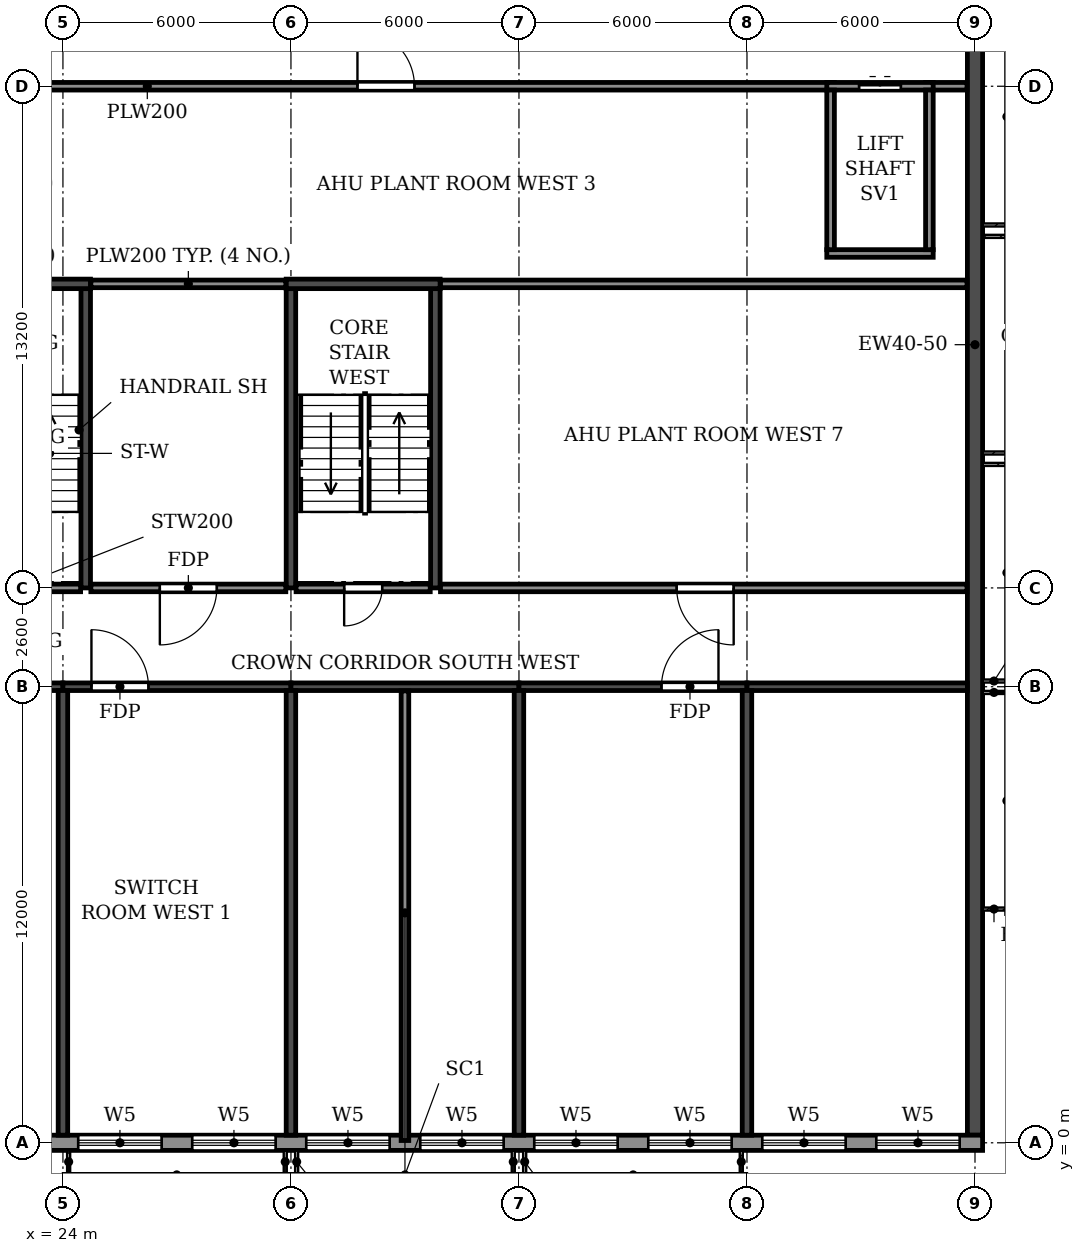
"""IFC4 building model, lengths in metres.
Left out: names, types, materials, properties, quantities, classifications, styles, units other than length and angle.
Written with IfcOpenShell. Run it as: python <this file> out.ifc"""

import sys

from ifc_helpers import new_model, si_unit, direction, frame, frame_2d, origin, place, context, subcontext, project, spatial, rectangle, extrude, element, fill, save


model = new_model("IFC4")
c1 = context("Model", 3, precision=1e-05, world=origin(), true_north=direction((0.0, 1.0)))
c2 = subcontext(c1, "Body", "Model", "MODEL_VIEW")
j1 = project(units=[si_unit("LENGTHUNIT", "METRE"), si_unit("PLANEANGLEUNIT", "RADIAN")], contexts=[c1])
p1 = place(None, origin())
s1 = spatial("IfcSite", under=j1, at=p1, CompositionType="ELEMENT")
p2 = place(p1, origin())
s2 = spatial("IfcBuilding", under=s1, at=p2, CompositionType="ELEMENT")
p3 = place(p2, frame((0.0, 0.0, 282.3)))
s3 = spatial("IfcBuildingStorey", under=s2, at=p3, CompositionType="ELEMENT", Elevation=282.3)
for number, where, z_axis, x_axis in (
    (1, (24.0, 0.2, 0.0), (0.0, 0.0, 1.0), (0.0, 1.0, 0.0)),
    (2, (30.0, 0.2, 0.0), (0.0, 0.0, 1.0), (0.0, 1.0, 0.0)),
    (3, (36.0, 0.2, 0.0), (0.0, 0.0, 1.0), (0.0, 1.0, 0.0)),
    (4, (42.0, 0.2, 0.0), (0.0, 0.0, 1.0), (0.0, 1.0, 0.0)),
):
    element("IfcWall", number, at=place(p3, frame(where, z_axis=z_axis, x_axis=x_axis)), inside=s3, PredefinedType="SHEAR", context=c2, shape_type="SweptSolid", body=[
        extrude(rectangle(XDim=11.7, YDim=0.25, at=frame_2d((5.85, 0.0))), origin(), (0.0, 0.0, 1.0), 3.05),
    ])
p4 = place(p3, frame((48.0, 0.2, 0.0), z_axis=(0.0, 0.0, 1.0), x_axis=(0.0, 1.0, 0.0)))
e5 = element("IfcWall", 5, at=p4, inside=s3, PredefinedType="SHEAR", context=c2, shape_type="SweptSolid", body=[
    extrude(rectangle(XDim=40.8, YDim=0.4, at=frame_2d((20.4, 0.0))), origin(), (0.0, 0.0, 1.0), 3.05),
])
p5 = place(p3, frame((18.2, 12.0, 0.0), z_axis=(0.0, 0.0, 1.0), x_axis=(1.0, 0.0, 0.0)))
e6 = element("IfcWall", 6, at=p5, inside=s3, PredefinedType="SHEAR", context=c2, shape_type="SweptSolid", body=[
    extrude(rectangle(XDim=5.8, YDim=0.2, at=frame_2d((2.9, 0.0))), origin(), (0.0, 0.0, 1.0), 2.45),
])
p6 = place(p3, frame((24.0, 12.0, 0.0), z_axis=(0.0, 0.0, 1.0), x_axis=(1.0, 0.0, 0.0)))
e7 = element("IfcWall", 7, at=p6, inside=s3, PredefinedType="SHEAR", context=c2, shape_type="SweptSolid", body=[
    extrude(rectangle(XDim=6.0, YDim=0.2, at=frame_2d((3.0, 0.0))), origin(), (0.0, 0.0, 1.0), 2.45),
])
p7 = place(p6, frame((0.75, 0.0, 0.0)))
e8 = element("IfcOpeningElement", 8, at=p7, cuts=e7, PredefinedType="OPENING", context=c2, shape_type="SweptSolid", body=[
    extrude(rectangle(XDim=1.5, YDim=2.1, at=frame_2d((0.75, 1.05))), frame((0.0, 0.11, 0.0), z_axis=(0.0, -1.0, 0.0), x_axis=(1.0, 0.0, 0.0)), (0.0, 0.0, 1.0), 0.22),
])
p8 = place(p3, frame((30.0, 12.0, 0.0), z_axis=(0.0, 0.0, 1.0), x_axis=(1.0, 0.0, 0.0)))
e9 = element("IfcWall", 9, at=p8, inside=s3, PredefinedType="SHEAR", context=c2, shape_type="SweptSolid", body=[
    extrude(rectangle(XDim=6.0, YDim=0.2, at=frame_2d((3.0, 0.0))), origin(), (0.0, 0.0, 1.0), 2.45),
])
p9 = place(p3, frame((36.0, 12.0, 0.0), z_axis=(0.0, 0.0, 1.0), x_axis=(1.0, 0.0, 0.0)))
e10 = element("IfcWall", 10, at=p9, inside=s3, PredefinedType="SHEAR", context=c2, shape_type="SweptSolid", body=[
    extrude(rectangle(XDim=6.0, YDim=0.2, at=frame_2d((3.0, 0.0))), origin(), (0.0, 0.0, 1.0), 2.45),
])
p10 = place(p9, frame((3.75, 0.0, 0.0)))
e11 = element("IfcOpeningElement", 11, at=p10, cuts=e10, PredefinedType="OPENING", context=c2, shape_type="SweptSolid", body=[
    extrude(rectangle(XDim=1.5, YDim=2.1, at=frame_2d((0.75, 1.05))), frame((0.0, 0.11, 0.0), z_axis=(0.0, -1.0, 0.0), x_axis=(1.0, 0.0, 0.0)), (0.0, 0.0, 1.0), 0.22),
])
p11 = place(p3, frame((42.0, 12.0, 0.0), z_axis=(0.0, 0.0, 1.0), x_axis=(1.0, 0.0, 0.0)))
e12 = element("IfcWall", 12, at=p11, inside=s3, PredefinedType="SHEAR", context=c2, shape_type="SweptSolid", body=[
    extrude(rectangle(XDim=5.8, YDim=0.2, at=frame_2d((2.9, 0.0))), origin(), (0.0, 0.0, 1.0), 2.45),
])
p12 = place(p3, frame((24.6, 14.6, 0.0), z_axis=(0.0, 0.0, 1.0), x_axis=(0.0, 1.0, 0.0)))
e13 = element("IfcWall", 13, at=p12, inside=s3, PredefinedType="SOLIDWALL", context=c2, shape_type="SweptSolid", body=[
    extrude(rectangle(XDim=7.875, YDim=0.25, at=frame_2d((3.938, 0.0))), origin(), (0.0, 0.0, 1.0), 3.05),
])
p13 = place(p3, frame((20.675, 22.6, 0.0), z_axis=(0.0, 0.0, 1.0), x_axis=(1.0, 0.0, 0.0)))
e14 = element("IfcWall", 14, at=p13, inside=s3, PredefinedType="SOLIDWALL", context=c2, shape_type="SweptSolid", body=[
    extrude(rectangle(XDim=4.05, YDim=0.25, at=frame_2d((2.025, 0.0))), origin(), (0.0, 0.0, 1.0), 3.05),
])
for number, where, z_axis, x_axis in (
    (15, (30.0, 14.6, 0.0), (0.0, 0.0, 1.0), (0.0, 1.0, 0.0)),
    (16, (33.8, 14.6, 0.0), (0.0, 0.0, 1.0), (0.0, 1.0, 0.0)),
):
    element("IfcWall", number, at=place(p3, frame(where, z_axis=z_axis, x_axis=x_axis)), inside=s3, PredefinedType="SOLIDWALL", context=c2, shape_type="SweptSolid", body=[
        extrude(rectangle(XDim=7.875, YDim=0.25, at=frame_2d((3.938, 0.0))), origin(), (0.0, 0.0, 1.0), 3.05),
    ])
p14 = place(p3, frame((29.875, 22.6, 0.0), z_axis=(0.0, 0.0, 1.0), x_axis=(1.0, 0.0, 0.0)))
e17 = element("IfcWall", 17, at=p14, inside=s3, PredefinedType="SOLIDWALL", context=c2, shape_type="SweptSolid", body=[
    extrude(rectangle(XDim=4.05, YDim=0.25, at=frame_2d((2.025, 0.0))), origin(), (0.0, 0.0, 1.0), 3.05),
])
p15 = place(p3, frame((22.683, 0.0, 0.0), z_axis=(0.0, 0.0, 1.0), x_axis=(1.0, 0.0, 0.0)))
e18 = element("IfcWall", 18, at=p15, inside=s3, PredefinedType="STANDARD", context=c2, shape_type="SweptSolid", body=[
    extrude(rectangle(XDim=25.517, YDim=0.4, at=frame_2d((12.759, 0.0))), origin(), (0.0, 0.0, 1.0), 3.05),
])
p16 = place(p15, frame((1.717, 0.0, 0.6)))
e19 = element("IfcOpeningElement", 19, at=p16, cuts=e18, PredefinedType="OPENING", context=c2, shape_type="SweptSolid", body=[
    extrude(rectangle(XDim=2.2, YDim=2.4, at=frame_2d((1.1, 1.2))), frame((0.0, 0.21, 0.0), z_axis=(0.0, -1.0, 0.0), x_axis=(1.0, 0.0, 0.0)), (0.0, 0.0, 1.0), 0.42),
])
p17 = place(p15, frame((4.717, 0.0, 0.6)))
e20 = element("IfcOpeningElement", 20, at=p17, cuts=e18, PredefinedType="OPENING", context=c2, shape_type="SweptSolid", body=[
    extrude(rectangle(XDim=2.2, YDim=2.4, at=frame_2d((1.1, 1.2))), frame((0.0, 0.21, 0.0), z_axis=(0.0, -1.0, 0.0), x_axis=(1.0, 0.0, 0.0)), (0.0, 0.0, 1.0), 0.42),
])
p18 = place(p15, frame((7.717, 0.0, 0.6)))
e21 = element("IfcOpeningElement", 21, at=p18, cuts=e18, PredefinedType="OPENING", context=c2, shape_type="SweptSolid", body=[
    extrude(rectangle(XDim=2.2, YDim=2.4, at=frame_2d((1.1, 1.2))), frame((0.0, 0.21, 0.0), z_axis=(0.0, -1.0, 0.0), x_axis=(1.0, 0.0, 0.0)), (0.0, 0.0, 1.0), 0.42),
])
p19 = place(p15, frame((10.717, 0.0, 0.6)))
e22 = element("IfcOpeningElement", 22, at=p19, cuts=e18, PredefinedType="OPENING", context=c2, shape_type="SweptSolid", body=[
    extrude(rectangle(XDim=2.2, YDim=2.4, at=frame_2d((1.1, 1.2))), frame((0.0, 0.21, 0.0), z_axis=(0.0, -1.0, 0.0), x_axis=(1.0, 0.0, 0.0)), (0.0, 0.0, 1.0), 0.42),
])
p20 = place(p15, frame((13.717, 0.0, 0.6)))
e23 = element("IfcOpeningElement", 23, at=p20, cuts=e18, PredefinedType="OPENING", context=c2, shape_type="SweptSolid", body=[
    extrude(rectangle(XDim=2.2, YDim=2.4, at=frame_2d((1.1, 1.2))), frame((0.0, 0.21, 0.0), z_axis=(0.0, -1.0, 0.0), x_axis=(1.0, 0.0, 0.0)), (0.0, 0.0, 1.0), 0.42),
])
p21 = place(p15, frame((16.717, 0.0, 0.6)))
e24 = element("IfcOpeningElement", 24, at=p21, cuts=e18, PredefinedType="OPENING", context=c2, shape_type="SweptSolid", body=[
    extrude(rectangle(XDim=2.2, YDim=2.4, at=frame_2d((1.1, 1.2))), frame((0.0, 0.21, 0.0), z_axis=(0.0, -1.0, 0.0), x_axis=(1.0, 0.0, 0.0)), (0.0, 0.0, 1.0), 0.42),
])
p22 = place(p15, frame((19.717, 0.0, 0.6)))
e25 = element("IfcOpeningElement", 25, at=p22, cuts=e18, PredefinedType="OPENING", context=c2, shape_type="SweptSolid", body=[
    extrude(rectangle(XDim=2.2, YDim=2.4, at=frame_2d((1.1, 1.2))), frame((0.0, 0.21, 0.0), z_axis=(0.0, -1.0, 0.0), x_axis=(1.0, 0.0, 0.0)), (0.0, 0.0, 1.0), 0.42),
])
p23 = place(p15, frame((22.717, 0.0, 0.6)))
e26 = element("IfcOpeningElement", 26, at=p23, cuts=e18, PredefinedType="OPENING", context=c2, shape_type="SweptSolid", body=[
    extrude(rectangle(XDim=2.2, YDim=2.4, at=frame_2d((1.1, 1.2))), frame((0.0, 0.21, 0.0), z_axis=(0.0, -1.0, 0.0), x_axis=(1.0, 0.0, 0.0)), (0.0, 0.0, 1.0), 0.42),
])
p24 = place(p3, frame((24.735, 14.6, 0.0), z_axis=(0.0, 0.0, 1.0), x_axis=(1.0, 0.0, 0.0)))
e27 = element("IfcWall", 27, at=p24, inside=s3, PredefinedType="PARTITIONING", context=c2, shape_type="SweptSolid", body=[
    extrude(rectangle(XDim=5.13, YDim=0.2, at=frame_2d((2.565, 0.0))), origin(), (0.0, 0.0, 1.0), 3.05),
])
p25 = place(p24, frame((1.815, 0.0, 0.0)))
e28 = element("IfcOpeningElement", 28, at=p25, cuts=e27, PredefinedType="OPENING", context=c2, shape_type="SweptSolid", body=[
    extrude(rectangle(XDim=1.5, YDim=2.1, at=frame_2d((0.75, 1.05))), frame((0.0, 0.11, 0.0), z_axis=(0.0, -1.0, 0.0), x_axis=(1.0, 0.0, 0.0)), (0.0, 0.0, 1.0), 0.22),
])
p26 = place(p3, frame((33.935, 14.6, 0.0), z_axis=(0.0, 0.0, 1.0), x_axis=(1.0, 0.0, 0.0)))
e29 = element("IfcWall", 29, at=p26, inside=s3, PredefinedType="PARTITIONING", context=c2, shape_type="SweptSolid", body=[
    extrude(rectangle(XDim=13.855, YDim=0.2, at=frame_2d((6.927, 0.0))), origin(), (0.0, 0.0, 1.0), 3.05),
])
p27 = place(p26, frame((6.215, 0.0, 0.0)))
e30 = element("IfcOpeningElement", 30, at=p27, cuts=e29, PredefinedType="OPENING", context=c2, shape_type="SweptSolid", body=[
    extrude(rectangle(XDim=1.5, YDim=2.1, at=frame_2d((0.75, 1.05))), frame((0.0, 0.11, 0.0), z_axis=(0.0, -1.0, 0.0), x_axis=(1.0, 0.0, 0.0)), (0.0, 0.0, 1.0), 0.22),
])
p28 = place(p3, frame((24.735, 22.6, 0.0), z_axis=(0.0, 0.0, 1.0), x_axis=(1.0, 0.0, 0.0)))
e31 = element("IfcWall", 31, at=p28, inside=s3, PredefinedType="PARTITIONING", context=c2, shape_type="SweptSolid", body=[
    extrude(rectangle(XDim=5.13, YDim=0.2, at=frame_2d((2.565, 0.0))), origin(), (0.0, 0.0, 1.0), 3.05),
])
p29 = place(p3, frame((33.935, 22.6, 0.0), z_axis=(0.0, 0.0, 1.0), x_axis=(1.0, 0.0, 0.0)))
e32 = element("IfcWall", 32, at=p29, inside=s3, PredefinedType="PARTITIONING", context=c2, shape_type="SweptSolid", body=[
    extrude(rectangle(XDim=13.855, YDim=0.2, at=frame_2d((6.927, 0.0))), origin(), (0.0, 0.0, 1.0), 3.05),
])
p30 = place(p3, frame((20.7, 27.8, 0.0), z_axis=(0.0, 0.0, 1.0), x_axis=(1.0, 0.0, 0.0)))
e33 = element("IfcWall", 33, at=p30, inside=s3, PredefinedType="PARTITIONING", context=c2, shape_type="SweptSolid", body=[
    extrude(rectangle(XDim=23.6, YDim=0.2, at=frame_2d((11.8, 0.0))), origin(), (0.0, 0.0, 1.0), 3.05),
])
p31 = place(p30, frame((11.05, 0.0, 0.0)))
e34 = element("IfcOpeningElement", 34, at=p31, cuts=e33, PredefinedType="OPENING", context=c2, shape_type="SweptSolid", body=[
    extrude(rectangle(XDim=1.5, YDim=2.1, at=frame_2d((0.75, 1.05))), frame((0.0, 0.11, 0.0), z_axis=(0.0, -1.0, 0.0), x_axis=(1.0, 0.0, 0.0)), (0.0, 0.0, 1.0), 0.22),
])
p32 = place(p3, frame((46.7, 27.8, 0.0), z_axis=(0.0, 0.0, 1.0), x_axis=(1.0, 0.0, 0.0)))
e35 = element("IfcWall", 35, at=p32, inside=s3, PredefinedType="PARTITIONING", context=c2, shape_type="SweptSolid", body=[
    extrude(rectangle(XDim=1.09, YDim=0.2, at=frame_2d((0.545, 0.0))), origin(), (0.0, 0.0, 1.0), 3.05),
])
p33 = place(p3, frame((33.0, 0.06, 0.0), z_axis=(0.0, 0.0, 1.0), x_axis=(0.0, 1.0, 0.0)))
e36 = element("IfcWall", 36, at=p33, inside=s3, PredefinedType="PARTITIONING", context=c2, shape_type="SweptSolid", body=[
    extrude(rectangle(XDim=11.83, YDim=0.2, at=frame_2d((5.915, 0.0))), origin(), (0.0, 0.0, 1.0), 3.05),
])
p34 = place(p3, frame((44.1, 23.4, 0.0), z_axis=(0.0, 0.0, 1.0), x_axis=(1.0, 0.0, 0.0)))
e37 = element("IfcWall", 37, at=p34, inside=s3, PredefinedType="PARTITIONING", context=c2, shape_type="SweptSolid", body=[
    extrude(rectangle(XDim=2.8, YDim=0.2, at=frame_2d((1.4, 0.0))), origin(), (0.0, 0.0, 1.0), 3.05),
])
p35 = place(p3, frame((44.1, 27.8, 0.0), z_axis=(0.0, 0.0, 1.0), x_axis=(1.0, 0.0, 0.0)))
e38 = element("IfcWall", 38, at=p35, inside=s3, PredefinedType="PARTITIONING", context=c2, shape_type="SweptSolid", body=[
    extrude(rectangle(XDim=2.8, YDim=0.2, at=frame_2d((1.4, 0.0))), origin(), (0.0, 0.0, 1.0), 3.05),
])
p36 = place(p35, frame((0.85, 0.0, 0.0)))
e39 = element("IfcOpeningElement", 39, at=p36, cuts=e38, PredefinedType="OPENING", context=c2, shape_type="SweptSolid", body=[
    extrude(rectangle(XDim=1.1, YDim=2.1, at=frame_2d((0.55, 1.05))), frame((0.0, 0.11, 0.0), z_axis=(0.0, -1.0, 0.0), x_axis=(1.0, 0.0, 0.0)), (0.0, 0.0, 1.0), 0.22),
])
for number, where, z_axis, x_axis in (
    (40, (44.2, 23.5, 0.0), (0.0, 0.0, 1.0), (0.0, 1.0, 0.0)),
    (41, (46.8, 23.5, 0.0), (0.0, 0.0, 1.0), (0.0, 1.0, 0.0)),
):
    element("IfcWall", number, at=place(p3, frame(where, z_axis=z_axis, x_axis=x_axis)), inside=s3, PredefinedType="PARTITIONING", context=c2, shape_type="SweptSolid", body=[
        extrude(rectangle(XDim=4.2, YDim=0.2, at=frame_2d((2.1, 0.0))), origin(), (0.0, 0.0, 1.0), 3.05),
    ])
p37 = place(p3, frame((20.935, 14.6, 0.0), z_axis=(0.0, 0.0, 1.0), x_axis=(1.0, 0.0, 0.0)))
e42 = element("IfcWall", 42, at=p37, inside=s3, PredefinedType="PARTITIONING", context=c2, shape_type="SweptSolid", body=[
    extrude(rectangle(XDim=3.53, YDim=0.2, at=frame_2d((1.765, 0.0))), origin(), (0.0, 0.0, 1.0), 3.05),
])
p38 = place(p3, frame((30.135, 14.6, 0.0), z_axis=(0.0, 0.0, 1.0), x_axis=(1.0, 0.0, 0.0)))
e43 = element("IfcWall", 43, at=p38, inside=s3, PredefinedType="PARTITIONING", context=c2, shape_type="SweptSolid", body=[
    extrude(rectangle(XDim=3.53, YDim=0.2, at=frame_2d((1.765, 0.0))), origin(), (0.0, 0.0, 1.0), 3.05),
])
p39 = place(p38, frame((1.265, 0.0, 0.0)))
e44 = element("IfcOpeningElement", 44, at=p39, cuts=e43, PredefinedType="OPENING", context=c2, shape_type="SweptSolid", body=[
    extrude(rectangle(XDim=1.0, YDim=2.1, at=frame_2d((0.5, 1.05))), frame((0.0, 0.11, 0.0), z_axis=(0.0, -1.0, 0.0), x_axis=(1.0, 0.0, 0.0)), (0.0, 0.0, 1.0), 0.22),
])
p40 = place(p16, origin())
e45 = element("IfcWindow", 45, at=p40, inside=s3, PartitioningType="TRIPLE_PANEL_HORIZONTAL", PredefinedType="WINDOW", context=c2, shape_type="SweptSolid", body=[
    extrude(rectangle(XDim=2.2, YDim=2.4, at=frame_2d((1.1, 1.2))), frame((0.0, 0.03, 0.0), z_axis=(0.0, -1.0, 0.0), x_axis=(1.0, 0.0, 0.0)), (0.0, 0.0, 1.0), 0.06),
])
fill(e19, e45)
p41 = place(p17, origin())
e46 = element("IfcWindow", 46, at=p41, inside=s3, PartitioningType="TRIPLE_PANEL_HORIZONTAL", PredefinedType="WINDOW", context=c2, shape_type="SweptSolid", body=[
    extrude(rectangle(XDim=2.2, YDim=2.4, at=frame_2d((1.1, 1.2))), frame((0.0, 0.03, 0.0), z_axis=(0.0, -1.0, 0.0), x_axis=(1.0, 0.0, 0.0)), (0.0, 0.0, 1.0), 0.06),
])
fill(e20, e46)
p42 = place(p18, origin())
e47 = element("IfcWindow", 47, at=p42, inside=s3, PartitioningType="TRIPLE_PANEL_HORIZONTAL", PredefinedType="WINDOW", context=c2, shape_type="SweptSolid", body=[
    extrude(rectangle(XDim=2.2, YDim=2.4, at=frame_2d((1.1, 1.2))), frame((0.0, 0.03, 0.0), z_axis=(0.0, -1.0, 0.0), x_axis=(1.0, 0.0, 0.0)), (0.0, 0.0, 1.0), 0.06),
])
fill(e21, e47)
p43 = place(p19, origin())
e48 = element("IfcWindow", 48, at=p43, inside=s3, PartitioningType="TRIPLE_PANEL_HORIZONTAL", PredefinedType="WINDOW", context=c2, shape_type="SweptSolid", body=[
    extrude(rectangle(XDim=2.2, YDim=2.4, at=frame_2d((1.1, 1.2))), frame((0.0, 0.03, 0.0), z_axis=(0.0, -1.0, 0.0), x_axis=(1.0, 0.0, 0.0)), (0.0, 0.0, 1.0), 0.06),
])
fill(e22, e48)
p44 = place(p20, origin())
e49 = element("IfcWindow", 49, at=p44, inside=s3, PartitioningType="TRIPLE_PANEL_HORIZONTAL", PredefinedType="WINDOW", context=c2, shape_type="SweptSolid", body=[
    extrude(rectangle(XDim=2.2, YDim=2.4, at=frame_2d((1.1, 1.2))), frame((0.0, 0.03, 0.0), z_axis=(0.0, -1.0, 0.0), x_axis=(1.0, 0.0, 0.0)), (0.0, 0.0, 1.0), 0.06),
])
fill(e23, e49)
p45 = place(p21, origin())
e50 = element("IfcWindow", 50, at=p45, inside=s3, PartitioningType="TRIPLE_PANEL_HORIZONTAL", PredefinedType="WINDOW", context=c2, shape_type="SweptSolid", body=[
    extrude(rectangle(XDim=2.2, YDim=2.4, at=frame_2d((1.1, 1.2))), frame((0.0, 0.03, 0.0), z_axis=(0.0, -1.0, 0.0), x_axis=(1.0, 0.0, 0.0)), (0.0, 0.0, 1.0), 0.06),
])
fill(e24, e50)
p46 = place(p22, origin())
e51 = element("IfcWindow", 51, at=p46, inside=s3, PartitioningType="TRIPLE_PANEL_HORIZONTAL", PredefinedType="WINDOW", context=c2, shape_type="SweptSolid", body=[
    extrude(rectangle(XDim=2.2, YDim=2.4, at=frame_2d((1.1, 1.2))), frame((0.0, 0.03, 0.0), z_axis=(0.0, -1.0, 0.0), x_axis=(1.0, 0.0, 0.0)), (0.0, 0.0, 1.0), 0.06),
])
fill(e25, e51)
p47 = place(p23, origin())
e52 = element("IfcWindow", 52, at=p47, inside=s3, PartitioningType="TRIPLE_PANEL_HORIZONTAL", PredefinedType="WINDOW", context=c2, shape_type="SweptSolid", body=[
    extrude(rectangle(XDim=2.2, YDim=2.4, at=frame_2d((1.1, 1.2))), frame((0.0, 0.03, 0.0), z_axis=(0.0, -1.0, 0.0), x_axis=(1.0, 0.0, 0.0)), (0.0, 0.0, 1.0), 0.06),
])
fill(e26, e52)
p48 = place(p31, origin())
e53 = element("IfcDoor", 53, at=p48, inside=s3, OperationType="DOUBLE_DOOR_SINGLE_SWING", PredefinedType="DOOR", context=c2, shape_type="SweptSolid", body=[
    extrude(rectangle(XDim=1.5, YDim=2.1, at=frame_2d((0.75, 1.05))), frame((0.0, 0.025, 0.0), z_axis=(0.0, -1.0, 0.0), x_axis=(1.0, 0.0, 0.0)), (0.0, 0.0, 1.0), 0.05),
])
fill(e34, e53)
p49 = place(p36, origin())
e54 = element("IfcDoor", 54, at=p49, inside=s3, OperationType="DOUBLE_DOOR_SLIDING", PredefinedType="DOOR", context=c2, shape_type="SweptSolid", body=[
    extrude(rectangle(XDim=1.1, YDim=2.1, at=frame_2d((0.55, 1.05))), frame((0.0, 0.025, 0.0), z_axis=(0.0, -1.0, 0.0), x_axis=(1.0, 0.0, 0.0)), (0.0, 0.0, 1.0), 0.05),
])
fill(e39, e54)
p50 = place(p7, origin())
e55 = element("IfcDoor", 55, at=p50, inside=s3, OperationType="DOUBLE_DOOR_SINGLE_SWING", PredefinedType="DOOR", context=c2, shape_type="SweptSolid", body=[
    extrude(rectangle(XDim=1.5, YDim=2.1, at=frame_2d((0.75, 1.05))), frame((0.0, 0.025, 0.0), z_axis=(0.0, -1.0, 0.0), x_axis=(1.0, 0.0, 0.0)), (0.0, 0.0, 1.0), 0.05),
])
fill(e8, e55)
p51 = place(p25, frame((1.5, 0.0, 0.0), z_axis=(0.0, 0.0, 1.0), x_axis=(-1.0, 0.0, 0.0)))
e56 = element("IfcDoor", 56, at=p51, inside=s3, OperationType="DOUBLE_DOOR_SINGLE_SWING", PredefinedType="DOOR", context=c2, shape_type="SweptSolid", body=[
    extrude(rectangle(XDim=1.5, YDim=2.1, at=frame_2d((0.75, 1.05))), frame((0.0, 0.025, 0.0), z_axis=(0.0, -1.0, 0.0), x_axis=(1.0, 0.0, 0.0)), (0.0, 0.0, 1.0), 0.05),
])
fill(e28, e56)
p52 = place(p10, origin())
e57 = element("IfcDoor", 57, at=p52, inside=s3, OperationType="DOUBLE_DOOR_SINGLE_SWING", PredefinedType="DOOR", context=c2, shape_type="SweptSolid", body=[
    extrude(rectangle(XDim=1.5, YDim=2.1, at=frame_2d((0.75, 1.05))), frame((0.0, 0.025, 0.0), z_axis=(0.0, -1.0, 0.0), x_axis=(1.0, 0.0, 0.0)), (0.0, 0.0, 1.0), 0.05),
])
fill(e11, e57)
p53 = place(p27, frame((1.5, 0.0, 0.0), z_axis=(0.0, 0.0, 1.0), x_axis=(-1.0, 0.0, 0.0)))
e58 = element("IfcDoor", 58, at=p53, inside=s3, OperationType="DOUBLE_DOOR_SINGLE_SWING", PredefinedType="DOOR", context=c2, shape_type="SweptSolid", body=[
    extrude(rectangle(XDim=1.5, YDim=2.1, at=frame_2d((0.75, 1.05))), frame((0.0, 0.025, 0.0), z_axis=(0.0, -1.0, 0.0), x_axis=(1.0, 0.0, 0.0)), (0.0, 0.0, 1.0), 0.05),
])
fill(e30, e58)
p54 = place(p39, frame((1.0, 0.0, 0.0), z_axis=(0.0, 0.0, 1.0), x_axis=(-1.0, 0.0, 0.0)))
e59 = element("IfcDoor", 59, at=p54, inside=s3, OperationType="SINGLE_SWING_RIGHT", PredefinedType="DOOR", context=c2, shape_type="SweptSolid", body=[
    extrude(rectangle(XDim=1.0, YDim=2.1, at=frame_2d((0.5, 1.05))), frame((0.0, 0.025, 0.0), z_axis=(0.0, -1.0, 0.0), x_axis=(1.0, 0.0, 0.0)), (0.0, 0.0, 1.0), 0.05),
])
fill(e44, e59)
save(model, sys.argv[1])
